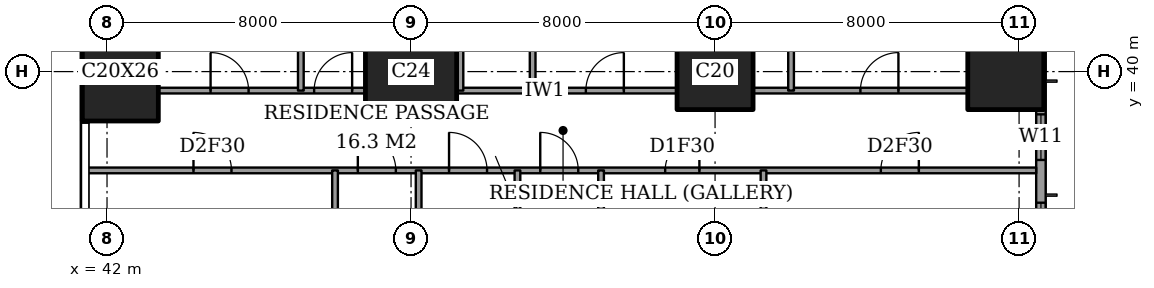
"""IFC4 building model, lengths in metres.
Left out: names, types, materials, properties, quantities, classifications, styles, units other than length and angle.
Written with IfcOpenShell. Run it as: python <this file> out.ifc"""

import sys

from ifc_helpers import new_model, si_unit, direction, frame, frame_2d, origin, origin_2d, place, context, subcontext, project, spatial, rectangle, extrude, element, fill, save


model = new_model("IFC4")
c1 = context("Model", 3, precision=1e-05, world=origin(), true_north=direction((0.0, 1.0)))
c2 = subcontext(c1, "Body", "Model", "MODEL_VIEW")
j1 = project(units=[si_unit("LENGTHUNIT", "METRE"), si_unit("PLANEANGLEUNIT", "RADIAN")], contexts=[c1])
p1 = place(None, origin())
s1 = spatial("IfcSite", under=j1, at=p1, CompositionType="ELEMENT")
p2 = place(p1, origin())
s2 = spatial("IfcBuilding", under=s1, at=p2, CompositionType="ELEMENT")
p3 = place(p2, frame((0.0, 0.0, 103.4)))
s3 = spatial("IfcBuildingStorey", under=s2, at=p3, CompositionType="ELEMENT", Elevation=103.4)
p4 = place(p3, frame((42.35, 40.0, 0.0), z_axis=(0.0, 0.0, 1.0), x_axis=(1.0, 0.0, 0.0)))
e1 = element("IfcColumn", 1, at=p4, inside=s3, PredefinedType="COLUMN", context=c2, shape_type="SweptSolid", body=[
    extrude(rectangle(XDim=2.0, YDim=2.6, at=origin_2d()), origin(), (0.0, 0.0, 1.0), 3.6),
])
p5 = place(p3, frame((50.0, 40.0, 0.0), z_axis=(0.0, 0.0, 1.0), x_axis=(1.0, 0.0, 0.0)))
e2 = element("IfcColumn", 2, at=p5, inside=s3, PredefinedType="COLUMN", context=c2, shape_type="SweptSolid", body=[
    extrude(rectangle(XDim=2.4, YDim=2.4, at=origin_2d()), origin(), (0.0, 0.0, 1.0), 3.6),
])
for number, where, z_axis, x_axis in (
    (3, (58.0, 40.0, 0.0), (0.0, 0.0, 1.0), (1.0, 0.0, 0.0)),
    (4, (65.65, 40.0, 0.0), (0.0, 0.0, 1.0), (1.0, 0.0, 0.0)),
):
    element("IfcColumn", number, at=place(p3, frame(where, z_axis=z_axis, x_axis=x_axis)), inside=s3, PredefinedType="COLUMN", context=c2, shape_type="SweptSolid", body=[
        extrude(rectangle(XDim=2.0, YDim=2.0, at=origin_2d()), origin(), (0.0, 0.0, 1.0), 3.6),
    ])
p6 = place(p3, frame((66.575, 3.175, 0.0), z_axis=(0.0, 0.0, 1.0), x_axis=(0.0, 1.0, 0.0)))
e5 = element("IfcWall", 5, at=p6, inside=s3, PredefinedType="SOLIDWALL", context=c2, shape_type="SweptSolid", body=[
    extrude(rectangle(XDim=41.65, YDim=0.25, at=frame_2d((20.825, 0.0))), origin(), (0.0, 0.0, 1.0), 3.6),
])
p7 = place(p6, frame((0.775, 0.0, 0.4)))
e6 = element("IfcOpeningElement", 6, at=p7, cuts=e5, PredefinedType="OPENING", context=c2, shape_type="SweptSolid", body=[
    extrude(rectangle(XDim=2.4, YDim=2.2, at=frame_2d((1.2, 1.1))), frame((0.0, 0.135, 0.0), z_axis=(0.0, -1.0, 0.0), x_axis=(1.0, 0.0, 0.0)), (0.0, 0.0, 1.0), 0.27),
])
p8 = place(p6, frame((6.1, 0.0, 0.4)))
e7 = element("IfcOpeningElement", 7, at=p8, cuts=e5, PredefinedType="OPENING", context=c2, shape_type="SweptSolid", body=[
    extrude(rectangle(XDim=1.2, YDim=2.2, at=frame_2d((0.6, 1.1))), frame((0.0, 0.135, 0.0), z_axis=(0.0, -1.0, 0.0), x_axis=(1.0, 0.0, 0.0)), (0.0, 0.0, 1.0), 0.27),
])
p9 = place(p6, frame((8.275, 0.0, 0.4)))
e8 = element("IfcOpeningElement", 8, at=p9, cuts=e5, PredefinedType="OPENING", context=c2, shape_type="SweptSolid", body=[
    extrude(rectangle(XDim=2.4, YDim=2.2, at=frame_2d((1.2, 1.1))), frame((0.0, 0.135, 0.0), z_axis=(0.0, -1.0, 0.0), x_axis=(1.0, 0.0, 0.0)), (0.0, 0.0, 1.0), 0.27),
])
p10 = place(p6, frame((15.775, 0.0, 0.4)))
e9 = element("IfcOpeningElement", 9, at=p10, cuts=e5, PredefinedType="OPENING", context=c2, shape_type="SweptSolid", body=[
    extrude(rectangle(XDim=2.4, YDim=2.2, at=frame_2d((1.2, 1.1))), frame((0.0, 0.135, 0.0), z_axis=(0.0, -1.0, 0.0), x_axis=(1.0, 0.0, 0.0)), (0.0, 0.0, 1.0), 0.27),
])
p11 = place(p6, frame((23.475, 0.0, 0.4)))
e10 = element("IfcOpeningElement", 10, at=p11, cuts=e5, PredefinedType="OPENING", context=c2, shape_type="SweptSolid", body=[
    extrude(rectangle(XDim=2.4, YDim=2.2, at=frame_2d((1.2, 1.1))), frame((0.0, 0.135, 0.0), z_axis=(0.0, -1.0, 0.0), x_axis=(1.0, 0.0, 0.0)), (0.0, 0.0, 1.0), 0.27),
])
p12 = place(p6, frame((30.975, 0.0, 0.4)))
e11 = element("IfcOpeningElement", 11, at=p12, cuts=e5, PredefinedType="OPENING", context=c2, shape_type="SweptSolid", body=[
    extrude(rectangle(XDim=2.4, YDim=2.2, at=frame_2d((1.2, 1.1))), frame((0.0, 0.135, 0.0), z_axis=(0.0, -1.0, 0.0), x_axis=(1.0, 0.0, 0.0)), (0.0, 0.0, 1.0), 0.27),
])
p13 = place(p6, frame((34.5, 0.0, 0.4)))
e12 = element("IfcOpeningElement", 12, at=p13, cuts=e5, PredefinedType="OPENING", context=c2, shape_type="SweptSolid", body=[
    extrude(rectangle(XDim=1.2, YDim=2.2, at=frame_2d((0.6, 1.1))), frame((0.0, 0.135, 0.0), z_axis=(0.0, -1.0, 0.0), x_axis=(1.0, 0.0, 0.0)), (0.0, 0.0, 1.0), 0.27),
])
p14 = place(p6, frame((38.475, 0.0, 0.4)))
e13 = element("IfcOpeningElement", 13, at=p14, cuts=e5, PredefinedType="OPENING", context=c2, shape_type="SweptSolid", body=[
    extrude(rectangle(XDim=2.4, YDim=2.2, at=frame_2d((1.2, 1.1))), frame((0.0, 0.135, 0.0), z_axis=(0.0, -1.0, 0.0), x_axis=(1.0, 0.0, 0.0)), (0.0, 0.0, 1.0), 0.27),
])
p15 = place(p3, frame((41.439, 37.4, 0.0), z_axis=(0.0, 0.0, 1.0), x_axis=(1.0, 0.0, 0.0)))
e14 = element("IfcWall", 14, at=p15, inside=s3, PredefinedType="PARTITIONING", context=c2, shape_type="SweptSolid", body=[
    extrude(rectangle(XDim=25.011, YDim=0.15, at=frame_2d((12.505, 0.0))), origin(), (0.0, 0.0, 1.0), 3.35),
])
p16 = place(p15, frame((11.961, 0.0, 0.0)))
e15 = element("IfcOpeningElement", 15, at=p16, cuts=e14, PredefinedType="OPENING", context=c2, shape_type="SweptSolid", body=[
    extrude(rectangle(XDim=1.0, YDim=2.1, at=frame_2d((0.5, 1.05))), frame((0.0, 0.085, 0.0), z_axis=(0.0, -1.0, 0.0), x_axis=(1.0, 0.0, 0.0)), (0.0, 0.0, 1.0), 0.17),
])
p17 = place(p15, frame((20.924, 0.0, 0.0)))
e16 = element("IfcOpeningElement", 16, at=p17, cuts=e14, PredefinedType="OPENING", context=c2, shape_type="SweptSolid", body=[
    extrude(rectangle(XDim=1.0, YDim=2.1, at=frame_2d((0.5, 1.05))), frame((0.0, 0.085, 0.0), z_axis=(0.0, -1.0, 0.0), x_axis=(1.0, 0.0, 0.0)), (0.0, 0.0, 1.0), 0.17),
])
p18 = place(p15, frame((15.249, 0.0, 0.0)))
e17 = element("IfcOpeningElement", 17, at=p18, cuts=e14, PredefinedType="OPENING", context=c2, shape_type="SweptSolid", body=[
    extrude(rectangle(XDim=0.9, YDim=2.1, at=frame_2d((0.45, 1.05))), frame((0.0, 0.085, 0.0), z_axis=(0.0, -1.0, 0.0), x_axis=(1.0, 0.0, 0.0)), (0.0, 0.0, 1.0), 0.17),
])
p19 = place(p15, frame((9.561, 0.0, 0.0)))
e18 = element("IfcOpeningElement", 18, at=p19, cuts=e14, PredefinedType="OPENING", context=c2, shape_type="SweptSolid", body=[
    extrude(rectangle(XDim=1.0, YDim=2.1, at=frame_2d((0.5, 1.05))), frame((0.0, 0.085, 0.0), z_axis=(0.0, -1.0, 0.0), x_axis=(1.0, 0.0, 0.0)), (0.0, 0.0, 1.0), 0.17),
])
p20 = place(p15, frame((7.161, 0.0, 0.0)))
e19 = element("IfcOpeningElement", 19, at=p20, cuts=e14, PredefinedType="OPENING", context=c2, shape_type="SweptSolid", body=[
    extrude(rectangle(XDim=1.0, YDim=2.1, at=frame_2d((0.5, 1.05))), frame((0.0, 0.085, 0.0), z_axis=(0.0, -1.0, 0.0), x_axis=(1.0, 0.0, 0.0)), (0.0, 0.0, 1.0), 0.17),
])
p21 = place(p15, frame((2.836, 0.0, 0.0)))
e20 = element("IfcOpeningElement", 20, at=p21, cuts=e14, PredefinedType="OPENING", context=c2, shape_type="SweptSolid", body=[
    extrude(rectangle(XDim=1.0, YDim=2.1, at=frame_2d((0.5, 1.05))), frame((0.0, 0.085, 0.0), z_axis=(0.0, -1.0, 0.0), x_axis=(1.0, 0.0, 0.0)), (0.0, 0.0, 1.0), 0.17),
])
p22 = place(p3, frame((43.35, 39.5, 0.0), z_axis=(0.0, 0.0, 1.0), x_axis=(1.0, 0.0, 0.0)))
e21 = element("IfcWall", 21, at=p22, inside=s3, PredefinedType="PARTITIONING", context=c2, shape_type="SweptSolid", body=[
    extrude(rectangle(XDim=5.45, YDim=0.15, at=frame_2d((2.725, 0.0))), origin(), (0.0, 0.0, 1.0), 3.35),
])
p23 = place(p22, frame((4.1, 0.0, 0.0)))
e22 = element("IfcOpeningElement", 22, at=p23, cuts=e21, PredefinedType="OPENING", context=c2, shape_type="SweptSolid", body=[
    extrude(rectangle(XDim=1.0, YDim=2.1, at=frame_2d((0.5, 1.05))), frame((0.0, 0.085, 0.0), z_axis=(0.0, -1.0, 0.0), x_axis=(1.0, 0.0, 0.0)), (0.0, 0.0, 1.0), 0.17),
])
p24 = place(p22, frame((1.375, 0.0, 0.0)))
e23 = element("IfcOpeningElement", 23, at=p24, cuts=e21, PredefinedType="OPENING", context=c2, shape_type="SweptSolid", body=[
    extrude(rectangle(XDim=1.0, YDim=2.1, at=frame_2d((0.5, 1.05))), frame((0.0, 0.085, 0.0), z_axis=(0.0, -1.0, 0.0), x_axis=(1.0, 0.0, 0.0)), (0.0, 0.0, 1.0), 0.17),
])
p25 = place(p3, frame((51.2, 39.5, 0.0), z_axis=(0.0, 0.0, 1.0), x_axis=(1.0, 0.0, 0.0)))
e24 = element("IfcWall", 24, at=p25, inside=s3, PredefinedType="PARTITIONING", context=c2, shape_type="SweptSolid", body=[
    extrude(rectangle(XDim=5.8, YDim=0.15, at=frame_2d((2.9, 0.0))), origin(), (0.0, 0.0, 1.0), 3.35),
])
p26 = place(p25, frame((3.4, 0.0, 0.0)))
e25 = element("IfcOpeningElement", 25, at=p26, cuts=e24, PredefinedType="OPENING", context=c2, shape_type="SweptSolid", body=[
    extrude(rectangle(XDim=1.0, YDim=2.1, at=frame_2d((0.5, 1.05))), frame((0.0, 0.085, 0.0), z_axis=(0.0, -1.0, 0.0), x_axis=(1.0, 0.0, 0.0)), (0.0, 0.0, 1.0), 0.17),
])
p27 = place(p3, frame((59.0, 39.5, 0.0), z_axis=(0.0, 0.0, 1.0), x_axis=(1.0, 0.0, 0.0)))
e26 = element("IfcWall", 26, at=p27, inside=s3, PredefinedType="PARTITIONING", context=c2, shape_type="SweptSolid", body=[
    extrude(rectangle(XDim=5.65, YDim=0.15, at=frame_2d((2.825, 0.0))), origin(), (0.0, 0.0, 1.0), 3.35),
])
p28 = place(p27, frame((2.825, 0.0, 0.0)))
e27 = element("IfcOpeningElement", 27, at=p28, cuts=e26, PredefinedType="OPENING", context=c2, shape_type="SweptSolid", body=[
    extrude(rectangle(XDim=1.0, YDim=2.1, at=frame_2d((0.5, 1.05))), frame((0.0, 0.085, 0.0), z_axis=(0.0, -1.0, 0.0), x_axis=(1.0, 0.0, 0.0)), (0.0, 0.0, 1.0), 0.17),
])
p29 = place(p3, frame((47.1, 39.5, 0.0), z_axis=(0.0, 0.0, 1.0), x_axis=(0.0, 1.0, 0.0)))
e28 = element("IfcWall", 28, at=p29, inside=s3, PredefinedType="PARTITIONING", context=c2, shape_type="SweptSolid", body=[
    extrude(rectangle(XDim=8.95, YDim=0.15, at=frame_2d((4.475, 0.0))), origin(), (0.0, 0.0, 1.0), 3.35),
])
p30 = place(p3, frame((48.0, 28.0, 0.0), z_axis=(0.0, 0.0, 1.0), x_axis=(0.0, 1.0, 0.0)))
e29 = element("IfcWall", 29, at=p30, inside=s3, PredefinedType="PARTITIONING", context=c2, shape_type="SweptSolid", body=[
    extrude(rectangle(XDim=9.4, YDim=0.15, at=frame_2d((4.7, 0.0))), origin(), (0.0, 0.0, 1.0), 3.35),
])
p31 = place(p30, frame((0.5, 0.0, 0.0)))
e30 = element("IfcOpeningElement", 30, at=p31, cuts=e29, PredefinedType="OPENING", context=c2, shape_type="SweptSolid", body=[
    extrude(rectangle(XDim=1.0, YDim=2.1, at=frame_2d((0.5, 1.05))), frame((0.0, 0.085, 0.0), z_axis=(0.0, -1.0, 0.0), x_axis=(1.0, 0.0, 0.0)), (0.0, 0.0, 1.0), 0.17),
])
p32 = place(p3, frame((50.2, 33.2, 0.0), z_axis=(0.0, 0.0, 1.0), x_axis=(0.0, 1.0, 0.0)))
e31 = element("IfcWall", 31, at=p32, inside=s3, PredefinedType="PARTITIONING", context=c2, shape_type="SweptSolid", body=[
    extrude(rectangle(XDim=4.2, YDim=0.15, at=frame_2d((2.1, 0.0))), origin(), (0.0, 0.0, 1.0), 3.35),
])
p33 = place(p3, frame((51.3, 39.5, 0.0), z_axis=(0.0, 0.0, 1.0), x_axis=(0.0, 1.0, 0.0)))
e32 = element("IfcWall", 32, at=p33, inside=s3, PredefinedType="PARTITIONING", context=c2, shape_type="SweptSolid", body=[
    extrude(rectangle(XDim=8.95, YDim=0.15, at=frame_2d((4.475, 0.0))), origin(), (0.0, 0.0, 1.0), 3.35),
])
p34 = place(p33, frame((4.025, 0.0, 0.0)))
e33 = element("IfcOpeningElement", 33, at=p34, cuts=e32, PredefinedType="OPENING", context=c2, shape_type="SweptSolid", body=[
    extrude(rectangle(XDim=0.9, YDim=2.1, at=frame_2d((0.45, 1.05))), frame((0.0, 0.085, 0.0), z_axis=(0.0, -1.0, 0.0), x_axis=(1.0, 0.0, 0.0)), (0.0, 0.0, 1.0), 0.17),
])
p35 = place(p3, frame((52.8, 30.0, 0.0), z_axis=(0.0, 0.0, 1.0), x_axis=(0.0, 1.0, 0.0)))
e34 = element("IfcWall", 34, at=p35, inside=s3, PredefinedType="PARTITIONING", context=c2, shape_type="SweptSolid", body=[
    extrude(rectangle(XDim=7.4, YDim=0.15, at=frame_2d((3.7, 0.0))), origin(), (0.0, 0.0, 1.0), 3.35),
])
p36 = place(p3, frame((53.2, 39.5, 0.0), z_axis=(0.0, 0.0, 1.0), x_axis=(0.0, 1.0, 0.0)))
e35 = element("IfcWall", 35, at=p36, inside=s3, PredefinedType="PARTITIONING", context=c2, shape_type="SweptSolid", body=[
    extrude(rectangle(XDim=8.95, YDim=0.15, at=frame_2d((4.475, 0.0))), origin(), (0.0, 0.0, 1.0), 3.35),
])
p37 = place(p3, frame((55.0, 28.0, 0.0), z_axis=(0.0, 0.0, 1.0), x_axis=(0.0, 1.0, 0.0)))
e36 = element("IfcWall", 36, at=p37, inside=s3, PredefinedType="PARTITIONING", context=c2, shape_type="SweptSolid", body=[
    extrude(rectangle(XDim=9.4, YDim=0.15, at=frame_2d((4.7, 0.0))), origin(), (0.0, 0.0, 1.0), 3.35),
])
p38 = place(p37, frame((0.5, 0.0, 0.0)))
e37 = element("IfcOpeningElement", 37, at=p38, cuts=e36, PredefinedType="OPENING", context=c2, shape_type="SweptSolid", body=[
    extrude(rectangle(XDim=1.0, YDim=2.1, at=frame_2d((0.5, 1.05))), frame((0.0, 0.085, 0.0), z_axis=(0.0, -1.0, 0.0), x_axis=(1.0, 0.0, 0.0)), (0.0, 0.0, 1.0), 0.17),
])
p39 = place(p3, frame((59.275, 33.2, 0.0), z_axis=(0.0, 0.0, 1.0), x_axis=(0.0, 1.0, 0.0)))
e38 = element("IfcWall", 38, at=p39, inside=s3, PredefinedType="PARTITIONING", context=c2, shape_type="SweptSolid", body=[
    extrude(rectangle(XDim=4.2, YDim=0.15, at=frame_2d((2.1, 0.0))), origin(), (0.0, 0.0, 1.0), 3.35),
])
p40 = place(p3, frame((60.0, 39.5, 0.0), z_axis=(0.0, 0.0, 1.0), x_axis=(0.0, 1.0, 0.0)))
e39 = element("IfcWall", 39, at=p40, inside=s3, PredefinedType="PARTITIONING", context=c2, shape_type="SweptSolid", body=[
    extrude(rectangle(XDim=8.95, YDim=0.15, at=frame_2d((4.475, 0.0))), origin(), (0.0, 0.0, 1.0), 3.35),
])
p41 = place(p12, origin())
e40 = element("IfcWindow", 40, at=p41, inside=s3, PartitioningType="SINGLE_PANEL", PredefinedType="WINDOW", context=c2, shape_type="SweptSolid", body=[
    extrude(rectangle(XDim=2.4, YDim=2.2, at=frame_2d((1.2, 1.1))), frame((0.0, 0.03, 0.0), z_axis=(0.0, -1.0, 0.0), x_axis=(1.0, 0.0, 0.0)), (0.0, 0.0, 1.0), 0.06),
])
fill(e11, e40)
p42 = place(p13, origin())
e41 = element("IfcWindow", 41, at=p42, inside=s3, PartitioningType="SINGLE_PANEL", PredefinedType="WINDOW", context=c2, shape_type="SweptSolid", body=[
    extrude(rectangle(XDim=1.2, YDim=2.2, at=frame_2d((0.6, 1.1))), frame((0.0, 0.03, 0.0), z_axis=(0.0, -1.0, 0.0), x_axis=(1.0, 0.0, 0.0)), (0.0, 0.0, 1.0), 0.06),
])
fill(e12, e41)
p43 = place(p28, origin())
e42 = element("IfcDoor", 42, at=p43, inside=s3, OperationType="SINGLE_SWING_LEFT", PredefinedType="DOOR", context=c2, shape_type="SweptSolid", body=[
    extrude(rectangle(XDim=1.0, YDim=2.1, at=frame_2d((0.5, 1.05))), frame((0.0, 0.025, 0.0), z_axis=(0.0, -1.0, 0.0), x_axis=(1.0, 0.0, 0.0)), (0.0, 0.0, 1.0), 0.05),
])
fill(e27, e42)
p44 = place(p26, origin())
e43 = element("IfcDoor", 43, at=p44, inside=s3, OperationType="SINGLE_SWING_LEFT", PredefinedType="DOOR", context=c2, shape_type="SweptSolid", body=[
    extrude(rectangle(XDim=1.0, YDim=2.1, at=frame_2d((0.5, 1.05))), frame((0.0, 0.025, 0.0), z_axis=(0.0, -1.0, 0.0), x_axis=(1.0, 0.0, 0.0)), (0.0, 0.0, 1.0), 0.05),
])
fill(e25, e43)
p45 = place(p23, origin())
e44 = element("IfcDoor", 44, at=p45, inside=s3, OperationType="SINGLE_SWING_LEFT", PredefinedType="DOOR", context=c2, shape_type="SweptSolid", body=[
    extrude(rectangle(XDim=1.0, YDim=2.1, at=frame_2d((0.5, 1.05))), frame((0.0, 0.025, 0.0), z_axis=(0.0, -1.0, 0.0), x_axis=(1.0, 0.0, 0.0)), (0.0, 0.0, 1.0), 0.05),
])
fill(e22, e44)
p46 = place(p24, origin())
e45 = element("IfcDoor", 45, at=p46, inside=s3, OperationType="SINGLE_SWING_RIGHT", PredefinedType="DOOR", context=c2, shape_type="SweptSolid", body=[
    extrude(rectangle(XDim=1.0, YDim=2.1, at=frame_2d((0.5, 1.05))), frame((0.0, 0.025, 0.0), z_axis=(0.0, -1.0, 0.0), x_axis=(1.0, 0.0, 0.0)), (0.0, 0.0, 1.0), 0.05),
])
fill(e23, e45)
p47 = place(p16, origin())
e46 = element("IfcDoor", 46, at=p47, inside=s3, OperationType="SINGLE_SWING_RIGHT", PredefinedType="DOOR", context=c2, shape_type="SweptSolid", body=[
    extrude(rectangle(XDim=1.0, YDim=2.1, at=frame_2d((0.5, 1.05))), frame((0.0, 0.025, 0.0), z_axis=(0.0, -1.0, 0.0), x_axis=(1.0, 0.0, 0.0)), (0.0, 0.0, 1.0), 0.05),
])
fill(e15, e46)
p48 = place(p17, origin())
e47 = element("IfcDoor", 47, at=p48, inside=s3, OperationType="SINGLE_SWING_LEFT", PredefinedType="DOOR", context=c2, shape_type="SweptSolid", body=[
    extrude(rectangle(XDim=1.0, YDim=2.1, at=frame_2d((0.5, 1.05))), frame((0.0, 0.025, 0.0), z_axis=(0.0, -1.0, 0.0), x_axis=(1.0, 0.0, 0.0)), (0.0, 0.0, 1.0), 0.05),
])
fill(e16, e47)
p49 = place(p18, origin())
e48 = element("IfcDoor", 48, at=p49, inside=s3, OperationType="SINGLE_SWING_LEFT", PredefinedType="DOOR", context=c2, shape_type="SweptSolid", body=[
    extrude(rectangle(XDim=0.9, YDim=2.1, at=frame_2d((0.45, 1.05))), frame((0.0, 0.025, 0.0), z_axis=(0.0, -1.0, 0.0), x_axis=(1.0, 0.0, 0.0)), (0.0, 0.0, 1.0), 0.05),
])
fill(e17, e48)
p50 = place(p19, origin())
e49 = element("IfcDoor", 49, at=p50, inside=s3, OperationType="SINGLE_SWING_RIGHT", PredefinedType="DOOR", context=c2, shape_type="SweptSolid", body=[
    extrude(rectangle(XDim=1.0, YDim=2.1, at=frame_2d((0.5, 1.05))), frame((0.0, 0.025, 0.0), z_axis=(0.0, -1.0, 0.0), x_axis=(1.0, 0.0, 0.0)), (0.0, 0.0, 1.0), 0.05),
])
fill(e18, e49)
p51 = place(p20, origin())
e50 = element("IfcDoor", 50, at=p51, inside=s3, OperationType="SINGLE_SWING_RIGHT", PredefinedType="DOOR", context=c2, shape_type="SweptSolid", body=[
    extrude(rectangle(XDim=1.0, YDim=2.1, at=frame_2d((0.5, 1.05))), frame((0.0, 0.025, 0.0), z_axis=(0.0, -1.0, 0.0), x_axis=(1.0, 0.0, 0.0)), (0.0, 0.0, 1.0), 0.05),
])
fill(e19, e50)
p52 = place(p21, origin())
e51 = element("IfcDoor", 51, at=p52, inside=s3, OperationType="SINGLE_SWING_RIGHT", PredefinedType="DOOR", context=c2, shape_type="SweptSolid", body=[
    extrude(rectangle(XDim=1.0, YDim=2.1, at=frame_2d((0.5, 1.05))), frame((0.0, 0.025, 0.0), z_axis=(0.0, -1.0, 0.0), x_axis=(1.0, 0.0, 0.0)), (0.0, 0.0, 1.0), 0.05),
])
fill(e20, e51)
save(model, sys.argv[1])
